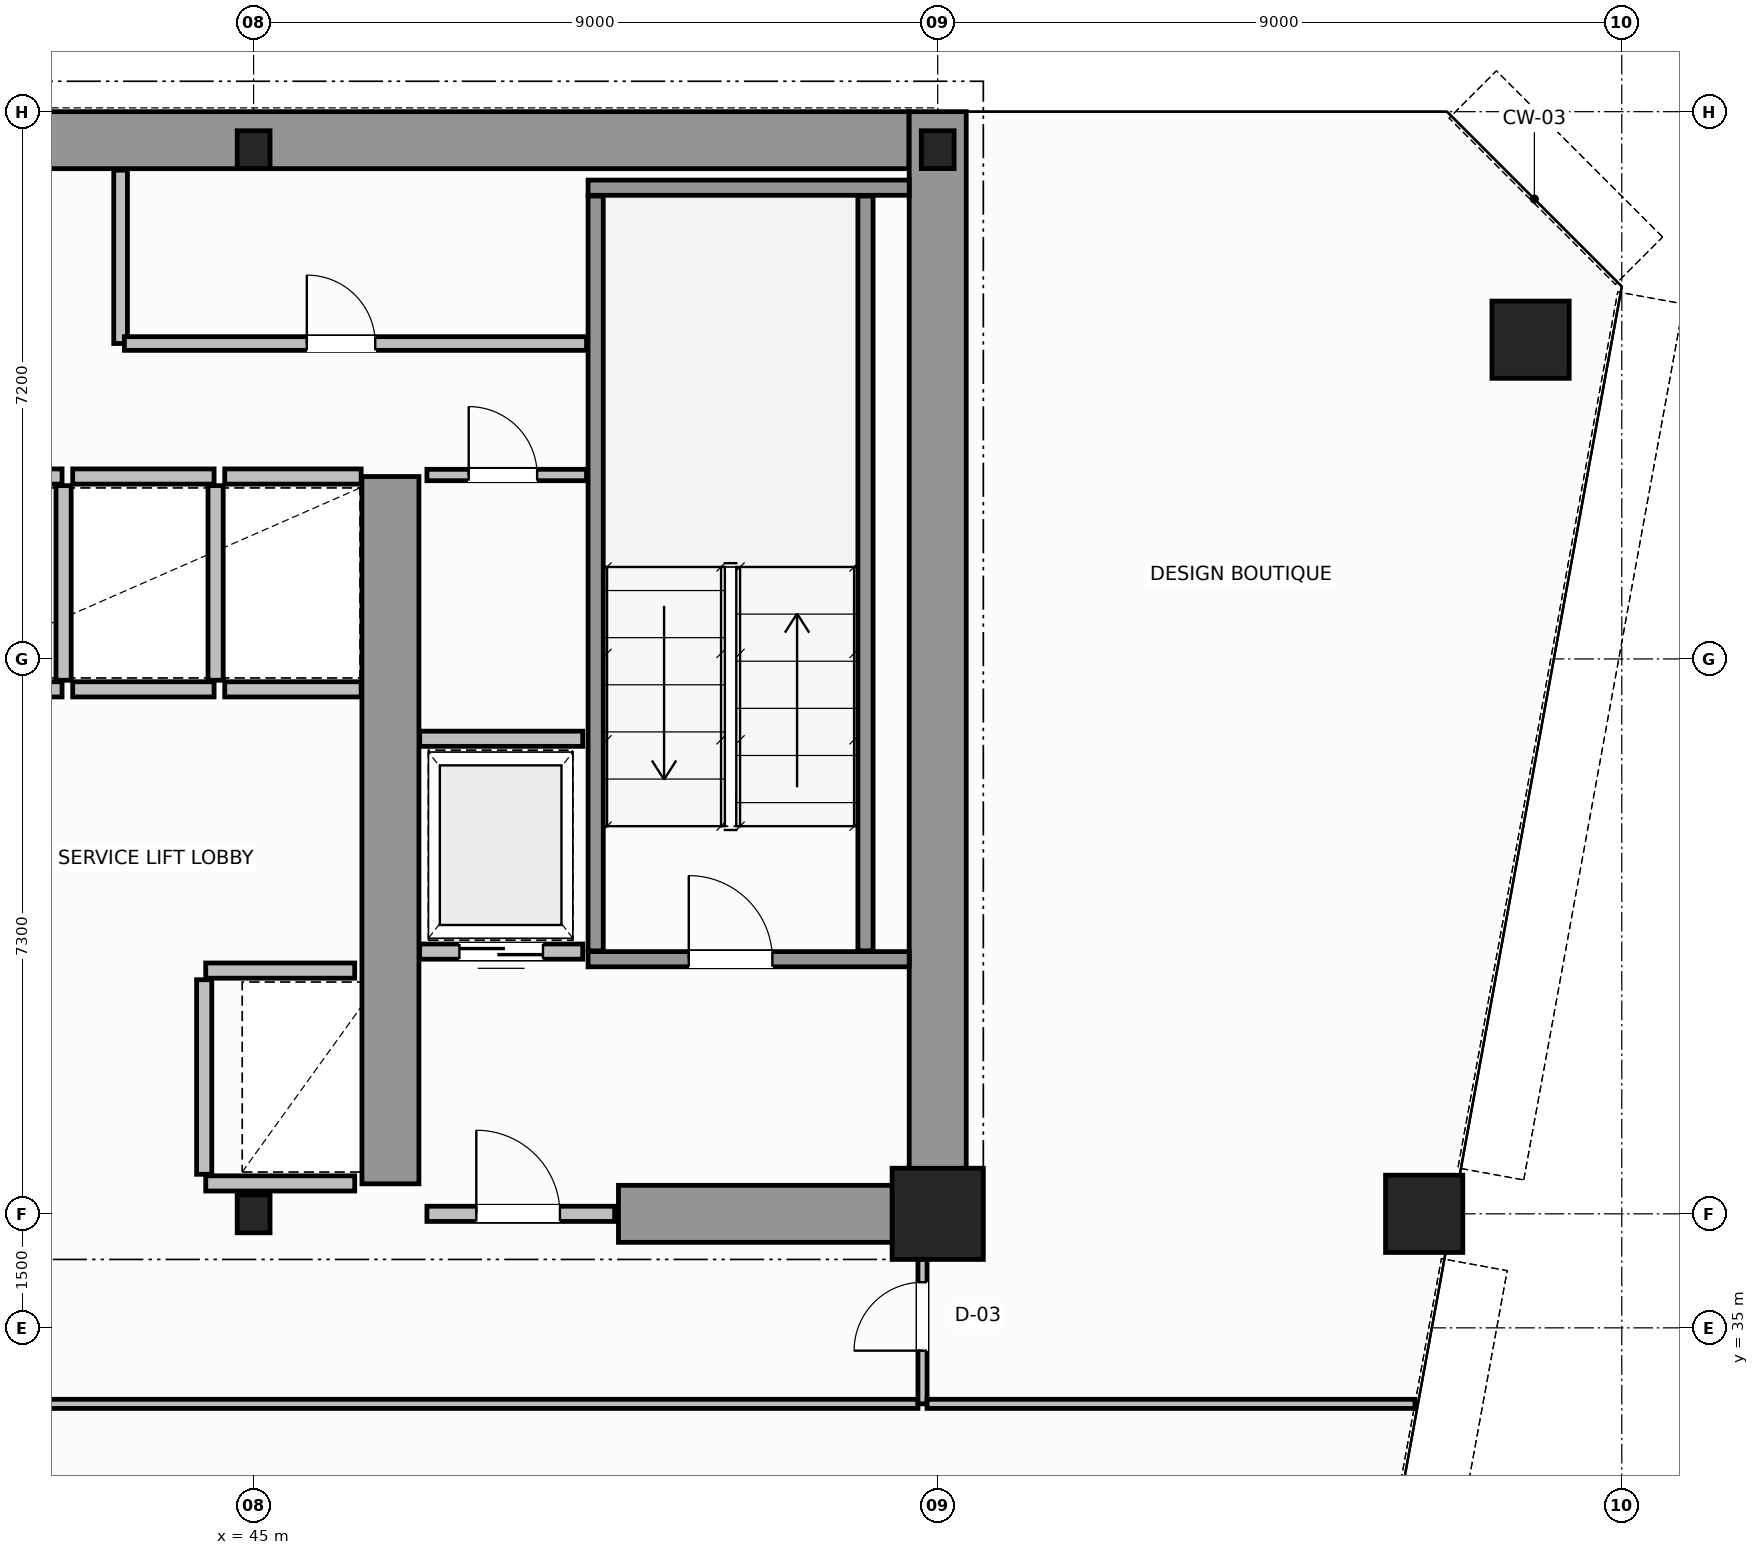
"""IFC4 building model, lengths in metres.
Left out: names, types, materials, properties, quantities, classifications, styles, units other than length and angle.
Written with IfcOpenShell. Run it as: python <this file> out.ifc"""

import sys

from ifc_helpers import new_model, si_unit, direction, frame, frame_2d, origin, origin_2d, place, context, subcontext, project, spatial, rectangle, hollow_circle, i_section, extrude, source, transform, mapped, element, fill, save


model = new_model("IFC4")
c1 = context("Model", 3, precision=1e-05, world=origin(), true_north=direction((0.0, 1.0)))
c2 = subcontext(c1, "Body", "Model", "MODEL_VIEW")
j1 = project(units=[si_unit("LENGTHUNIT", "METRE"), si_unit("PLANEANGLEUNIT", "RADIAN")], contexts=[c1])
p1 = place(None, origin())
s1 = spatial("IfcSite", under=j1, at=p1, CompositionType="ELEMENT")
p2 = place(p1, origin())
s2 = spatial("IfcBuilding", under=s1, at=p2, CompositionType="ELEMENT")
p3 = place(p2, frame((0.0, 0.0, 153.8)))
s3 = spatial("IfcBuildingStorey", under=s2, at=p3, CompositionType="ELEMENT", Elevation=153.8)
m1 = source(origin(), c2, "Body", "SweptSolid", [
    extrude(i_section(OverallWidth=0.432, OverallDepth=0.498, WebThickness=0.055, FlangeThickness=0.068, FilletRadius=0.015, at=origin_2d()), origin(), (0.0, 0.0, 1.0), 3.8),
])
p4 = place(p3, frame((45.0, 36.5, 0.0), z_axis=(0.0, 0.0, 1.0), x_axis=(1.0, 0.0, 0.0)))
e1 = element("IfcColumn", 1, at=p4, inside=s3, PredefinedType="COLUMN", context=c2, shape_type="MappedRepresentation", body=[
    mapped(m1, transform((0.0, 0.0, 0.0), scale=1.0)),
])
m2 = source(origin(), c2, "Body", "SweptSolid", [
    extrude(rectangle(XDim=1.2, YDim=1.2, at=origin_2d()), origin(), (0.0, 0.0, 1.0), 3.8),
])
p5 = place(p3, frame((54.0, 36.5, 0.0), z_axis=(0.0, 0.0, 1.0), x_axis=(1.0, 0.0, 0.0)))
e2 = element("IfcColumn", 2, at=p5, inside=s3, PredefinedType="COLUMN", context=c2, shape_type="MappedRepresentation", body=[
    mapped(m2, transform((0.0, 0.0, 0.0), scale=1.0)),
])
for number, where, z_axis, x_axis in (
    (3, (45.0, 50.5, 0.0), (0.0, 0.0, 1.0), (1.0, 0.0, 0.0)),
    (4, (54.0, 50.5, 0.0), (0.0, 0.0, 1.0), (1.0, 0.0, 0.0)),
):
    element("IfcColumn", number, at=place(p3, frame(where, z_axis=z_axis, x_axis=x_axis)), inside=s3, PredefinedType="COLUMN", context=c2, shape_type="MappedRepresentation", body=[
        mapped(m1, transform((0.0, 0.0, 0.0), scale=1.0)),
    ])
m3 = source(origin(), c2, "Body", "SweptSolid", [
    extrude(hollow_circle(Radius=0.508, WallThickness=0.045, at=origin_2d()), origin(), (0.0, 0.0, 1.0), 3.8),
])
for number, where, z_axis, x_axis in (
    (5, (61.8, 48.0, 0.0), (0.0, 0.0, 1.0), (1.0, 0.0, 0.0)),
    (6, (60.4, 36.5, 0.0), (0.0, 0.0, 1.0), (1.0, 0.0, 0.0)),
):
    element("IfcColumn", number, at=place(p3, frame(where, z_axis=z_axis, x_axis=x_axis)), inside=s3, PredefinedType="COLUMN", context=c2, shape_type="MappedRepresentation", body=[
        mapped(m3, transform((0.0, 0.0, 0.0), scale=1.0)),
    ])
p6 = place(p3, frame((34.002, 50.625, 0.0), z_axis=(0.0, 0.0, 1.0), x_axis=(1.0, 0.0, 0.0)))
e7 = element("IfcWall", 7, at=p6, inside=s3, PredefinedType="SHEAR", context=c2, shape_type="SweptSolid", body=[
    extrude(rectangle(XDim=19.619, YDim=0.75, at=frame_2d((9.81, 0.0))), origin(), (0.0, 0.0, 1.0), 3.8),
])
p7 = place(p3, frame((54.0, 36.5, 0.0), z_axis=(0.0, 0.0, 1.0), x_axis=(0.0, 1.0, 0.0)))
e8 = element("IfcWall", 8, at=p7, inside=s3, PredefinedType="SHEAR", context=c2, shape_type="SweptSolid", body=[
    extrude(rectangle(XDim=14.5, YDim=0.75, at=frame_2d((7.25, 0.0))), origin(), (0.0, 0.0, 1.0), 3.8),
])
p8 = place(p3, frame((49.8, 36.5, 0.0), z_axis=(0.0, 0.0, 1.0), x_axis=(1.0, 0.0, 0.0)))
e9 = element("IfcWall", 9, at=p8, inside=s3, PredefinedType="SHEAR", context=c2, shape_type="SweptSolid", body=[
    extrude(rectangle(XDim=3.805, YDim=0.75, at=frame_2d((1.902, 0.0))), origin(), (0.0, 0.0, 1.0), 2.38),
])
p9 = place(p3, frame((46.8, 36.895, 0.0), z_axis=(0.0, 0.0, 1.0), x_axis=(0.0, 1.0, 0.0)))
e10 = element("IfcWall", 10, at=p9, inside=s3, PredefinedType="SHEAR", context=c2, shape_type="SweptSolid", body=[
    extrude(rectangle(XDim=9.305, YDim=0.75, at=frame_2d((4.652, 0.0))), origin(), (0.0, 0.0, 1.0), 3.8),
])
p10 = place(p3, frame((49.4, 39.85, 0.0), z_axis=(0.0, 0.0, 1.0), x_axis=(1.0, 0.0, 0.0)))
e11 = element("IfcWall", 11, at=p10, inside=s3, PredefinedType="SOLIDWALL", context=c2, shape_type="SweptSolid", body=[
    extrude(rectangle(XDim=4.225, YDim=0.2, at=frame_2d((2.113, 0.0))), origin(), (0.0, 0.0, 1.0), 3.8),
])
p11 = place(p10, frame((1.325, 0.0, 0.0)))
e12 = element("IfcOpeningElement", 12, at=p11, cuts=e11, PredefinedType="OPENING", context=c2, shape_type="SweptSolid", body=[
    extrude(rectangle(XDim=1.1, YDim=2.15, at=frame_2d((0.55, 1.075))), frame((0.0, 0.11, 0.0), z_axis=(0.0, -1.0, 0.0), x_axis=(1.0, 0.0, 0.0)), (0.0, 0.0, 1.0), 0.22),
])
p12 = place(p3, frame((49.4, 50.0, 0.0), z_axis=(0.0, 0.0, 1.0), x_axis=(1.0, 0.0, 0.0)))
e13 = element("IfcWall", 13, at=p12, inside=s3, PredefinedType="SOLIDWALL", context=c2, shape_type="SweptSolid", body=[
    extrude(rectangle(XDim=4.225, YDim=0.2, at=frame_2d((2.113, 0.0))), origin(), (0.0, 0.0, 1.0), 3.8),
])
for number, where, z_axis, x_axis in (
    (14, (49.5, 39.96, 0.0), (0.0, 0.0, 1.0), (0.0, 1.0, 0.0)),
    (15, (53.05, 39.96, 0.0), (0.0, 0.0, 1.0), (0.0, 1.0, 0.0)),
):
    element("IfcWall", number, at=place(p3, frame(where, z_axis=z_axis, x_axis=x_axis)), inside=s3, PredefinedType="SOLIDWALL", context=c2, shape_type="SweptSolid", body=[
        extrude(rectangle(XDim=9.93, YDim=0.2, at=frame_2d((4.965, 0.0))), origin(), (0.0, 0.0, 1.0), 3.8),
    ])
p13 = place(p3, frame((47.28, 36.5, 0.0), z_axis=(0.0, 0.0, 1.0), x_axis=(1.0, 0.0, 0.0)))
e16 = element("IfcWall", 16, at=p13, inside=s3, PredefinedType="SOLIDWALL", context=c2, shape_type="SweptSolid", body=[
    extrude(rectangle(XDim=2.47, YDim=0.2, at=frame_2d((1.235, 0.0))), origin(), (0.0, 0.0, 1.0), 2.37),
])
p14 = place(p13, frame((0.65, 0.0, 0.0)))
e17 = element("IfcOpeningElement", 17, at=p14, cuts=e16, PredefinedType="OPENING", context=c2, shape_type="SweptSolid", body=[
    extrude(rectangle(XDim=1.1, YDim=2.15, at=frame_2d((0.55, 1.075))), frame((0.0, 0.11, 0.0), z_axis=(0.0, -1.0, 0.0), x_axis=(1.0, 0.0, 0.0)), (0.0, 0.0, 1.0), 0.22),
])
p15 = place(p3, frame((44.37, 39.7, 0.0), z_axis=(0.0, 0.0, 1.0), x_axis=(1.0, 0.0, 0.0)))
e18 = element("IfcWall", 18, at=p15, inside=s3, PredefinedType="SOLIDWALL", context=c2, shape_type="SweptSolid", body=[
    extrude(rectangle(XDim=1.96, YDim=0.2, at=frame_2d((0.98, 0.0))), origin(), (0.0, 0.0, 1.0), 3.58),
])
p16 = place(p3, frame((44.37, 36.9, 0.0), z_axis=(0.0, 0.0, 1.0), x_axis=(1.0, 0.0, 0.0)))
e19 = element("IfcWall", 19, at=p16, inside=s3, PredefinedType="SOLIDWALL", context=c2, shape_type="SweptSolid", body=[
    extrude(rectangle(XDim=1.96, YDim=0.2, at=frame_2d((0.98, 0.0))), origin(), (0.0, 0.0, 1.0), 2.37),
])
p17 = place(p3, frame((44.35, 37.02, 0.0), z_axis=(0.0, 0.0, 1.0), x_axis=(0.0, 1.0, 0.0)))
e20 = element("IfcWall", 20, at=p17, inside=s3, PredefinedType="SOLIDWALL", context=c2, shape_type="SweptSolid", body=[
    extrude(rectangle(XDim=2.56, YDim=0.2, at=frame_2d((1.28, 0.0))), origin(), (0.0, 0.0, 1.0), 3.58),
])
for number, where, z_axis, x_axis in (
    (21, (40.62, 43.4, 0.0), (0.0, 0.0, 1.0), (1.0, 0.0, 0.0)),
    (22, (40.62, 46.2, 0.0), (0.0, 0.0, 1.0), (1.0, 0.0, 0.0)),
):
    element("IfcWall", number, at=place(p3, frame(where, z_axis=z_axis, x_axis=x_axis)), inside=s3, PredefinedType="SOLIDWALL", context=c2, shape_type="SweptSolid", body=[
        extrude(rectangle(XDim=1.86, YDim=0.2, at=frame_2d((0.93, 0.0))), origin(), (0.0, 0.0, 1.0), 3.58),
    ])
p18 = place(p3, frame((42.5, 43.52, 0.0), z_axis=(0.0, 0.0, 1.0), x_axis=(0.0, 1.0, 0.0)))
e23 = element("IfcWall", 23, at=p18, inside=s3, PredefinedType="SOLIDWALL", context=c2, shape_type="SweptSolid", body=[
    extrude(rectangle(XDim=2.56, YDim=0.2, at=frame_2d((1.28, 0.0))), origin(), (0.0, 0.0, 1.0), 3.58),
])
for number, where, z_axis, x_axis in (
    (24, (42.62, 43.4, 0.0), (0.0, 0.0, 1.0), (1.0, 0.0, 0.0)),
    (25, (42.62, 46.2, 0.0), (0.0, 0.0, 1.0), (1.0, 0.0, 0.0)),
):
    element("IfcWall", number, at=place(p3, frame(where, z_axis=z_axis, x_axis=x_axis)), inside=s3, PredefinedType="SOLIDWALL", context=c2, shape_type="SweptSolid", body=[
        extrude(rectangle(XDim=1.86, YDim=0.2, at=frame_2d((0.93, 0.0))), origin(), (0.0, 0.0, 1.0), 3.58),
    ])
p19 = place(p3, frame((44.5, 43.52, 0.0), z_axis=(0.0, 0.0, 1.0), x_axis=(0.0, 1.0, 0.0)))
e26 = element("IfcWall", 26, at=p19, inside=s3, PredefinedType="SOLIDWALL", context=c2, shape_type="SweptSolid", body=[
    extrude(rectangle(XDim=2.56, YDim=0.2, at=frame_2d((1.28, 0.0))), origin(), (0.0, 0.0, 1.0), 3.58),
])
for number, where, z_axis, x_axis in (
    (27, (44.62, 43.4, 0.0), (0.0, 0.0, 1.0), (1.0, 0.0, 0.0)),
    (28, (44.62, 46.2, 0.0), (0.0, 0.0, 1.0), (1.0, 0.0, 0.0)),
):
    element("IfcWall", number, at=place(p3, frame(where, z_axis=z_axis, x_axis=x_axis)), inside=s3, PredefinedType="SOLIDWALL", context=c2, shape_type="SweptSolid", body=[
        extrude(rectangle(XDim=1.795, YDim=0.2, at=frame_2d((0.897, 0.0))), origin(), (0.0, 0.0, 1.0), 3.58),
    ])
p20 = place(p3, frame((47.185, 39.95, 0.0), z_axis=(0.0, 0.0, 1.0), x_axis=(1.0, 0.0, 0.0)))
e29 = element("IfcWall", 29, at=p20, inside=s3, PredefinedType="SOLIDWALL", context=c2, shape_type="SweptSolid", body=[
    extrude(rectangle(XDim=2.145, YDim=0.2, at=frame_2d((1.073, 0.0))), origin(), (0.0, 0.0, 1.0), 3.58),
])
p21 = place(p20, frame((0.522, 0.0, 0.0)))
e30 = element("IfcOpeningElement", 30, at=p21, cuts=e29, PredefinedType="OPENING", context=c2, shape_type="SweptSolid", body=[
    extrude(rectangle(XDim=1.1, YDim=2.15, at=frame_2d((0.55, 1.075))), frame((0.0, 0.11, 0.0), z_axis=(0.0, -1.0, 0.0), x_axis=(1.0, 0.0, 0.0)), (0.0, 0.0, 1.0), 0.22),
])
p22 = place(p3, frame((47.185, 42.75, 0.0), z_axis=(0.0, 0.0, 1.0), x_axis=(1.0, 0.0, 0.0)))
e31 = element("IfcWall", 31, at=p22, inside=s3, PredefinedType="SOLIDWALL", context=c2, shape_type="SweptSolid", body=[
    extrude(rectangle(XDim=2.145, YDim=0.2, at=frame_2d((1.073, 0.0))), origin(), (0.0, 0.0, 1.0), 3.58),
])
p23 = place(p3, frame((47.28, 46.22, 0.0), z_axis=(0.0, 0.0, 1.0), x_axis=(1.0, 0.0, 0.0)))
e32 = element("IfcWall", 32, at=p23, inside=s3, PredefinedType="PARTITIONING", context=c2, shape_type="SweptSolid", body=[
    extrude(rectangle(XDim=2.1, YDim=0.15, at=frame_2d((1.05, 0.0))), origin(), (0.0, 0.0, 1.0), 3.58),
])
p24 = place(p23, frame((0.55, 0.0, 0.0)))
e33 = element("IfcOpeningElement", 33, at=p24, cuts=e32, PredefinedType="OPENING", context=c2, shape_type="SweptSolid", body=[
    extrude(rectangle(XDim=0.9, YDim=2.1, at=frame_2d((0.45, 1.05))), frame((0.0, 0.085, 0.0), z_axis=(0.0, -1.0, 0.0), x_axis=(1.0, 0.0, 0.0)), (0.0, 0.0, 1.0), 0.17),
])
p25 = place(p3, frame((43.25, 47.95, 0.0), z_axis=(0.0, 0.0, 1.0), x_axis=(0.0, 1.0, 0.0)))
e34 = element("IfcWall", 34, at=p25, inside=s3, PredefinedType="PLUMBINGWALL", context=c2, shape_type="SweptSolid", body=[
    extrude(rectangle(XDim=2.28, YDim=0.18, at=frame_2d((1.14, 0.0))), origin(), (0.0, 0.0, 1.0), 3.58),
])
p26 = place(p3, frame((43.3, 47.95, 0.0), z_axis=(0.0, 0.0, 1.0), x_axis=(1.0, 0.0, 0.0)))
e35 = element("IfcWall", 35, at=p26, inside=s3, PredefinedType="PLUMBINGWALL", context=c2, shape_type="SweptSolid", body=[
    extrude(rectangle(XDim=6.08, YDim=0.18, at=frame_2d((3.04, 0.0))), origin(), (0.0, 0.0, 1.0), 3.58),
])
p27 = place(p26, frame((2.4, 0.0, 0.0)))
e36 = element("IfcOpeningElement", 36, at=p27, cuts=e35, PredefinedType="OPENING", context=c2, shape_type="SweptSolid", body=[
    extrude(rectangle(XDim=0.9, YDim=2.15, at=frame_2d((0.45, 1.075))), frame((0.0, 0.1, 0.0), z_axis=(0.0, -1.0, 0.0), x_axis=(1.0, 0.0, 0.0)), (0.0, 0.0, 1.0), 0.2),
])
p28 = place(p3, frame((34.86, 34.0, 0.0), z_axis=(0.0, 0.0, 1.0), x_axis=(1.0, 0.0, 0.0)))
e37 = element("IfcWall", 37, at=p28, inside=s3, PredefinedType="PARTITIONING", context=c2, shape_type="SweptSolid", body=[
    extrude(rectangle(XDim=18.88, YDim=0.12, at=frame_2d((9.44, 0.0))), origin(), (0.0, 0.0, 1.0), 3.58),
])
p29 = place(p3, frame((53.8, 34.0, 0.0), z_axis=(0.0, 0.0, 1.0), x_axis=(0.0, 1.0, 0.0)))
e38 = element("IfcWall", 38, at=p29, inside=s3, PredefinedType="PARTITIONING", context=c2, shape_type="SweptSolid", body=[
    extrude(rectangle(XDim=2.44, YDim=0.12, at=frame_2d((1.22, 0.0))), origin(), (0.0, 0.0, 1.0), 3.58),
])
p30 = place(p29, frame((0.7, 0.0, 0.0)))
e39 = element("IfcOpeningElement", 39, at=p30, cuts=e38, PredefinedType="OPENING", context=c2, shape_type="SweptSolid", body=[
    extrude(rectangle(XDim=0.9, YDim=2.15, at=frame_2d((0.45, 1.075))), frame((0.0, 0.07, 0.0), z_axis=(0.0, -1.0, 0.0), x_axis=(1.0, 0.0, 0.0)), (0.0, 0.0, 1.0), 0.14),
])
p31 = place(p3, frame((53.86, 34.0, 0.0), z_axis=(0.0, 0.0, 1.0), x_axis=(1.0, 0.0, 0.0)))
e40 = element("IfcWall", 40, at=p31, inside=s3, PredefinedType="PARTITIONING", context=c2, shape_type="SweptSolid", body=[
    extrude(rectangle(XDim=6.418, YDim=0.12, at=frame_2d((3.209, 0.0))), origin(), (0.0, 0.0, 1.0), 3.58),
])
m4 = source(origin(), c2, "Body", "SweptSolid", [
    extrude(rectangle(XDim=1.1, YDim=2.15, at=frame_2d((0.55, 1.075))), frame((0.0, 0.025, 0.0), z_axis=(0.0, -1.0, 0.0), x_axis=(1.0, 0.0, 0.0)), (0.0, 0.0, 1.0), 0.05),
])
p32 = place(p11, origin())
e41 = element("IfcDoor", 41, at=p32, inside=s3, OperationType="SINGLE_SWING_RIGHT", PredefinedType="DOOR", context=c2, shape_type="MappedRepresentation", body=[
    mapped(m4, transform((0.0, 0.0, 0.0), scale=1.0)),
])
fill(e12, e41)
p33 = place(p14, origin())
e42 = element("IfcDoor", 42, at=p33, inside=s3, OperationType="SINGLE_SWING_LEFT", PredefinedType="DOOR", context=c2, shape_type="MappedRepresentation", body=[
    mapped(m4, transform((0.0, 0.0, 0.0), scale=1.0)),
])
fill(e17, e42)
p34 = place(p21, origin())
e43 = element("IfcDoor", 43, at=p34, inside=s3, OperationType="DOUBLE_DOOR_SLIDING", PredefinedType="DOOR", context=c2, shape_type="MappedRepresentation", body=[
    mapped(m4, transform((0.0, 0.0, 0.0), scale=1.0)),
])
fill(e30, e43)
m5 = source(origin(), c2, "Body", "SweptSolid", [
    extrude(rectangle(XDim=0.9, YDim=2.1, at=frame_2d((0.45, 1.05))), frame((0.0, 0.025, 0.0), z_axis=(0.0, -1.0, 0.0), x_axis=(1.0, 0.0, 0.0)), (0.0, 0.0, 1.0), 0.05),
])
p35 = place(p24, origin())
e44 = element("IfcDoor", 44, at=p35, inside=s3, OperationType="SINGLE_SWING_RIGHT", PredefinedType="DOOR", context=c2, shape_type="MappedRepresentation", body=[
    mapped(m5, transform((0.0, 0.0, 0.0), scale=1.0)),
])
fill(e33, e44)
m6 = source(origin(), c2, "Body", "SweptSolid", [
    extrude(rectangle(XDim=0.9, YDim=2.15, at=frame_2d((0.45, 1.075))), frame((0.0, 0.025, 0.0), z_axis=(0.0, -1.0, 0.0), x_axis=(1.0, 0.0, 0.0)), (0.0, 0.0, 1.0), 0.05),
])
p36 = place(p27, origin())
e45 = element("IfcDoor", 45, at=p36, inside=s3, OperationType="SINGLE_SWING_RIGHT", PredefinedType="DOOR", context=c2, shape_type="MappedRepresentation", body=[
    mapped(m6, transform((0.0, 0.0, 0.0), scale=1.0)),
])
fill(e36, e45)
p37 = place(p30, origin())
e46 = element("IfcDoor", 46, at=p37, inside=s3, OperationType="SINGLE_SWING_RIGHT", PredefinedType="DOOR", context=c2, shape_type="MappedRepresentation", body=[
    mapped(m6, transform((0.0, 0.0, 0.0), scale=1.0)),
])
fill(e39, e46)
save(model, sys.argv[1])
